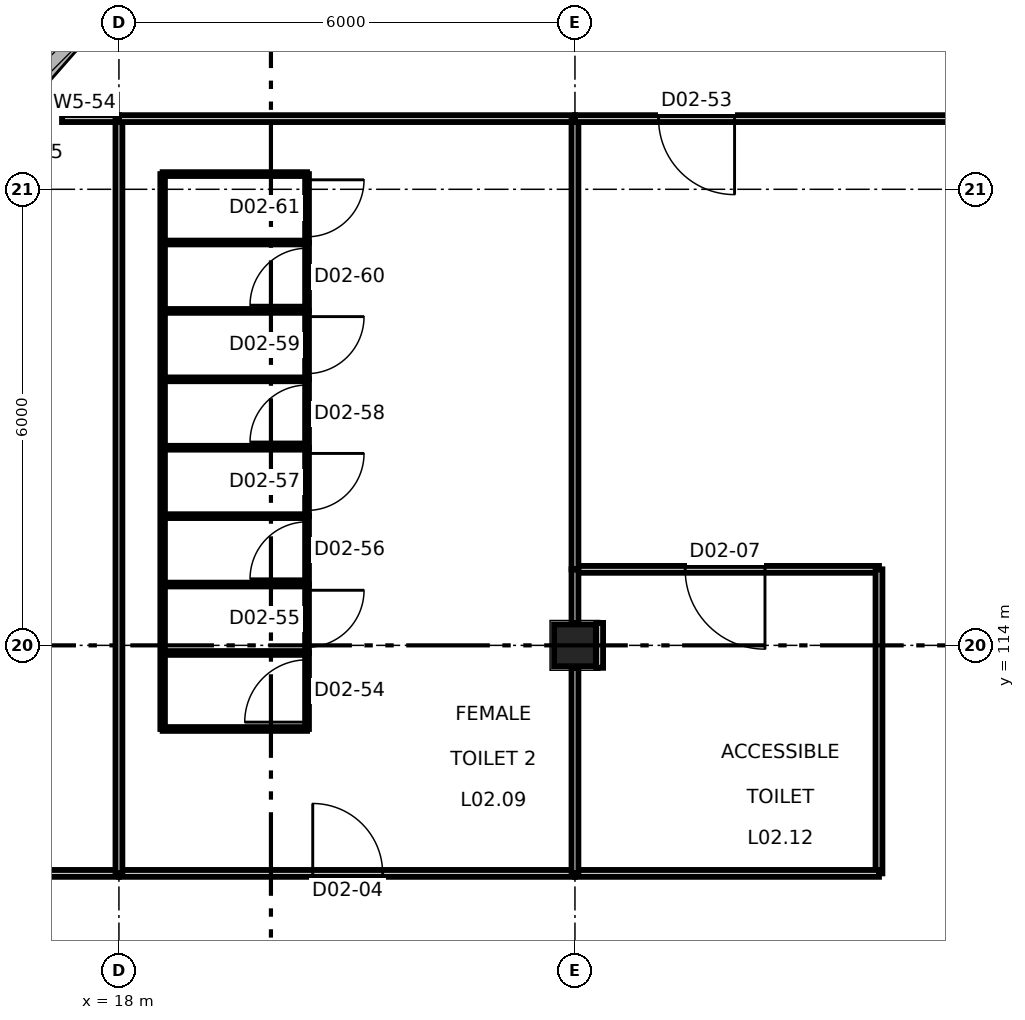
"""IFC4 building model, lengths in metres.
Left out: names, types, materials, properties, quantities, classifications, styles, units other than length and angle.
Written with IfcOpenShell. Run it as: python <this file> out.ifc"""

import sys

from ifc_helpers import new_model, si_unit, direction, frame, frame_2d, origin, origin_2d, place, context, subcontext, project, spatial, polyline, rectangle, outline, extrude, element, fill, save


model = new_model("IFC4")
c1 = context("Model", 3, precision=1e-05, world=origin(), true_north=direction((0.0, 1.0)))
c2 = subcontext(c1, "Body", "Model", "MODEL_VIEW")
j1 = project(units=[si_unit("LENGTHUNIT", "METRE"), si_unit("PLANEANGLEUNIT", "RADIAN")], contexts=[c1])
p1 = place(None, origin())
s1 = spatial("IfcSite", under=j1, at=p1, CompositionType="ELEMENT")
p2 = place(p1, origin())
s2 = spatial("IfcBuilding", under=s1, at=p2, CompositionType="ELEMENT")
p3 = place(p2, frame((0.0, 0.0, 12.0)))
s3 = spatial("IfcBuildingStorey", under=s2, at=p3, CompositionType="ELEMENT", Elevation=12.0)
p4 = place(p3, frame((24.0, 114.0, 0.0), z_axis=(0.0, 0.0, 1.0), x_axis=(1.0, 0.0, 0.0)))
e1 = element("IfcColumn", 1, at=p4, inside=s3, PredefinedType="COLUMN", context=c2, shape_type="SweptSolid", body=[
    extrude(rectangle(XDim=0.55, YDim=0.55, at=origin_2d()), origin(), (0.0, 0.0, 1.0), 4.5),
])
p5 = place(p3, frame((17.938, 122.571, 0.0), z_axis=(0.74138193161, -0.495258620594, 0.452848462745), x_axis=(-0.555487117891, -0.831525141854, 1.792587e-05)))
e2 = element("IfcWall", 2, at=p5, inside=s3, PredefinedType="SOLIDWALL", context=c2, shape_type="SweptSolid", body=[
    extrude(outline(polyline([(0.0, 0.0), (0.897, -2.776e-17), (0.759, -4.654), (0.138, -4.655), (0.0, 0.0)])), origin(), (9.955e-05, 0.453, 0.892), 0.449),
])
p6 = place(p3, frame((17.44, 121.825, 0.0), z_axis=(0.67027340996, -0.587941516676, 0.452833665786), x_axis=(-0.659435029258, -0.751761559077, 2.1938488e-05)))
e3 = element("IfcWall", 3, at=p6, inside=s3, PredefinedType="SOLIDWALL", context=c2, shape_type="SweptSolid", body=[
    extrude(outline(polyline([(0.0, 0.0), (0.897, -2.776e-17), (0.759, -4.654), (0.138, -4.654), (0.0, 0.0)])), origin(), (-0.0, 0.453, 0.892), 0.449),
])
p7 = place(p3, frame((16.848, 121.151, 0.0), z_axis=(0.58793091204, -0.670281410701, 0.452835591728), x_axis=(-0.75177274522, -0.659422276866, -1.779507e-05)))
e4 = element("IfcWall", 4, at=p7, inside=s3, PredefinedType="SOLIDWALL", context=c2, shape_type="SweptSolid", body=[
    extrude(outline(polyline([(0.0, 0.0), (0.897, 5.551e-17), (0.758, -4.654), (0.138, -4.654), (0.0, 0.0)])), origin(), (0.0, 0.453, 0.892), 0.449),
])
p8 = place(p3, frame((12.0, 111.0, 0.0), z_axis=(0.0, 0.0, 1.0), x_axis=(1.0, 0.0, 0.0)))
e5 = element("IfcWall", 5, at=p8, inside=s3, PredefinedType="PARTITIONING", context=c2, shape_type="SweptSolid", body=[
    extrude(rectangle(XDim=6.0, YDim=0.09, at=frame_2d((3.0, 0.0))), origin(), (0.0, 0.0, 1.0), 4.25),
])
p9 = place(p3, frame((17.251, 120.93, 0.0), z_axis=(0.0, 0.0, 1.0), x_axis=(1.0, 0.0, 0.0)))
e6 = element("IfcWall", 6, at=p9, inside=s3, PredefinedType="PARTITIONING", context=c2, shape_type="SweptSolid", body=[
    extrude(rectangle(XDim=0.749, YDim=0.09, at=frame_2d((0.374, 0.0))), origin(), (0.0, 0.0, 1.0), 4.25),
])
p10 = place(p3, frame((18.0, 111.0, 0.0), z_axis=(0.0, 0.0, 1.0), x_axis=(1.0, 0.0, 0.0)))
e7 = element("IfcWall", 7, at=p10, inside=s3, PredefinedType="PARTITIONING", context=c2, shape_type="SweptSolid", body=[
    extrude(rectangle(XDim=6.0, YDim=0.09, at=frame_2d((3.0, 0.0))), origin(), (0.0, 0.0, 1.0), 4.25),
])
p11 = place(p10, frame((2.55, 0.0, 0.0)))
e8 = element("IfcOpeningElement", 8, at=p11, cuts=e7, PredefinedType="OPENING", context=c2, shape_type="SweptSolid", body=[
    extrude(rectangle(XDim=0.92, YDim=2.04, at=frame_2d((0.46, 1.02))), frame((0.0, 0.055, 0.0), z_axis=(0.0, -1.0, 0.0), x_axis=(1.0, 0.0, 0.0)), (0.0, 0.0, 1.0), 0.11),
])
p12 = place(p3, frame((18.0, 111.0, 0.0), z_axis=(0.0, 0.0, 1.0), x_axis=(0.0, 1.0, 0.0)))
e9 = element("IfcWall", 9, at=p12, inside=s3, PredefinedType="PARTITIONING", context=c2, shape_type="SweptSolid", body=[
    extrude(rectangle(XDim=9.93, YDim=0.09, at=frame_2d((4.965, 0.0))), origin(), (0.0, 0.0, 1.0), 4.25),
])
p13 = place(p3, frame((18.0, 120.93, 0.0), z_axis=(0.0, 0.0, 1.0), x_axis=(1.0, 0.0, 0.0)))
e10 = element("IfcWall", 10, at=p13, inside=s3, PredefinedType="PARTITIONING", context=c2, shape_type="SweptSolid", body=[
    extrude(rectangle(XDim=6.0, YDim=0.09, at=frame_2d((3.0, 0.0))), origin(), (0.0, 0.0, 1.0), 4.25),
])
p14 = place(p3, frame((24.0, 115.0, 0.0), z_axis=(0.0, 0.0, 1.0), x_axis=(1.0, 0.0, 0.0)))
e11 = element("IfcWall", 11, at=p14, inside=s3, PredefinedType="PARTITIONING", context=c2, shape_type="SweptSolid", body=[
    extrude(rectangle(XDim=4.0, YDim=0.09, at=frame_2d((2.0, 0.0))), origin(), (0.0, 0.0, 1.0), 4.25),
])
p15 = place(p14, frame((1.45, 0.0, 0.0)))
e12 = element("IfcOpeningElement", 12, at=p15, cuts=e11, PredefinedType="OPENING", context=c2, shape_type="SweptSolid", body=[
    extrude(rectangle(XDim=1.05, YDim=2.1, at=frame_2d((0.525, 1.05))), frame((0.0, 0.055, 0.0), z_axis=(0.0, -1.0, 0.0), x_axis=(1.0, 0.0, 0.0)), (0.0, 0.0, 1.0), 0.11),
])
for number, where, z_axis, x_axis in (
    (13, (28.0, 111.0, 0.0), (0.0, 0.0, 1.0), (0.0, 1.0, 0.0)),
    (14, (24.0, 111.0, 0.0), (0.0, 0.0, 1.0), (1.0, 0.0, 0.0)),
):
    element("IfcWall", number, at=place(p3, frame(where, z_axis=z_axis, x_axis=x_axis)), inside=s3, PredefinedType="PARTITIONING", context=c2, shape_type="SweptSolid", body=[
        extrude(rectangle(XDim=4.0, YDim=0.09, at=frame_2d((2.0, 0.0))), origin(), (0.0, 0.0, 1.0), 4.25),
    ])
p16 = place(p3, frame((24.0, 114.295, 0.0), z_axis=(0.0, 0.0, 1.0), x_axis=(0.0, 1.0, 0.0)))
e15 = element("IfcWall", 15, at=p16, inside=s3, PredefinedType="PARTITIONING", context=c2, shape_type="SweptSolid", body=[
    extrude(rectangle(XDim=0.705, YDim=0.09, at=frame_2d((0.353, 0.0))), origin(), (0.0, 0.0, 1.0), 4.25),
])
p17 = place(p3, frame((24.0, 111.0, 0.0), z_axis=(0.0, 0.0, 1.0), x_axis=(0.0, 1.0, 0.0)))
e16 = element("IfcWall", 16, at=p17, inside=s3, PredefinedType="PARTITIONING", context=c2, shape_type="SweptSolid", body=[
    extrude(rectangle(XDim=2.705, YDim=0.09, at=frame_2d((1.353, 0.0))), origin(), (0.0, 0.0, 1.0), 4.25),
])
p18 = place(p3, frame((24.325, 113.705, 0.0), z_axis=(0.0, 0.0, 1.0), x_axis=(0.0, 1.0, 0.0)))
e17 = element("IfcWall", 17, at=p18, inside=s3, PredefinedType="PARTITIONING", context=c2, shape_type="SweptSolid", body=[
    extrude(rectangle(XDim=0.59, YDim=0.09, at=frame_2d((0.295, 0.0))), origin(), (0.0, 0.0, 1.0), 4.25),
])
p19 = place(p3, frame((24.0, 115.0, 0.0), z_axis=(0.0, 0.0, 1.0), x_axis=(0.0, 1.0, 0.0)))
e18 = element("IfcWall", 18, at=p19, inside=s3, PredefinedType="PARTITIONING", context=c2, shape_type="SweptSolid", body=[
    extrude(rectangle(XDim=5.93, YDim=0.09, at=frame_2d((2.965, 0.0))), origin(), (0.0, 0.0, 1.0), 4.25),
])
p20 = place(p3, frame((24.0, 120.93, 0.0), z_axis=(0.0, 0.0, 1.0), x_axis=(1.0, 0.0, 0.0)))
e19 = element("IfcWall", 19, at=p20, inside=s3, PredefinedType="PARTITIONING", context=c2, shape_type="SweptSolid", body=[
    extrude(rectangle(XDim=18.0, YDim=0.09, at=frame_2d((9.0, 0.0))), origin(), (0.0, 0.0, 1.0), 3.55),
])
p21 = place(p20, frame((9.85, 0.0, 0.0)))
e20 = element("IfcOpeningElement", 20, at=p21, cuts=e19, PredefinedType="OPENING", context=c2, shape_type="SweptSolid", body=[
    extrude(rectangle(XDim=1.8, YDim=2.1, at=frame_2d((0.9, 1.05))), frame((0.0, 0.055, 0.0), z_axis=(0.0, -1.0, 0.0), x_axis=(1.0, 0.0, 0.0)), (0.0, 0.0, 1.0), 0.11),
])
p22 = place(p20, frame((1.1, 0.0, 0.0)))
e21 = element("IfcOpeningElement", 21, at=p22, cuts=e19, PredefinedType="OPENING", context=c2, shape_type="SweptSolid", body=[
    extrude(rectangle(XDim=1.0, YDim=2.1, at=frame_2d((0.5, 1.05))), frame((0.0, 0.055, 0.0), z_axis=(0.0, -1.0, 0.0), x_axis=(1.0, 0.0, 0.0)), (0.0, 0.0, 1.0), 0.11),
])
p23 = place(p3, frame((18.575, 112.9, 0.0), z_axis=(0.0, 0.0, 1.0), x_axis=(0.0, 1.0, 0.0)))
e22 = element("IfcWall", 22, at=p23, inside=s3, PredefinedType="PARTITIONING", context=c2, shape_type="SweptSolid", body=[
    extrude(rectangle(XDim=7.3, YDim=0.06, at=frame_2d((3.65, 0.0))), origin(), (0.0, 0.0, 1.0), 2.1),
])
for number, where, z_axis, x_axis in (
    (23, (18.575, 112.9, 0.0), (0.0, 0.0, 1.0), (1.0, 0.0, 0.0)),
    (24, (18.575, 113.9, 0.0), (0.0, 0.0, 1.0), (1.0, 0.0, 0.0)),
    (25, (18.575, 114.8, 0.0), (0.0, 0.0, 1.0), (1.0, 0.0, 0.0)),
    (26, (18.575, 115.7, 0.0), (0.0, 0.0, 1.0), (1.0, 0.0, 0.0)),
    (27, (18.575, 116.6, 0.0), (0.0, 0.0, 1.0), (1.0, 0.0, 0.0)),
    (28, (18.575, 117.5, 0.0), (0.0, 0.0, 1.0), (1.0, 0.0, 0.0)),
    (29, (18.575, 118.4, 0.0), (0.0, 0.0, 1.0), (1.0, 0.0, 0.0)),
    (30, (18.575, 119.3, 0.0), (0.0, 0.0, 1.0), (1.0, 0.0, 0.0)),
    (31, (18.575, 120.2, 0.0), (0.0, 0.0, 1.0), (1.0, 0.0, 0.0)),
):
    element("IfcWall", number, at=place(p3, frame(where, z_axis=z_axis, x_axis=x_axis)), inside=s3, PredefinedType="PARTITIONING", context=c2, shape_type="SweptSolid", body=[
        extrude(rectangle(XDim=1.9, YDim=0.05, at=frame_2d((0.95, 0.0))), origin(), (0.0, 0.0, 1.0), 2.1),
    ])
p24 = place(p3, frame((20.475, 112.9, 0.0), z_axis=(0.0, 0.0, 1.0), x_axis=(0.0, 1.0, 0.0)))
e32 = element("IfcWall", 32, at=p24, inside=s3, PredefinedType="PARTITIONING", context=c2, shape_type="SweptSolid", body=[
    extrude(rectangle(XDim=1.0, YDim=0.05, at=frame_2d((0.5, 0.0))), origin(), (0.0, 0.0, 1.0), 2.1),
])
p25 = place(p24, frame((0.09, 0.0, 0.0)))
e33 = element("IfcOpeningElement", 33, at=p25, cuts=e32, PredefinedType="OPENING", context=c2, shape_type="SweptSolid", body=[
    extrude(rectangle(XDim=0.82, YDim=2.0, at=frame_2d((0.41, 1.0))), frame((0.0, 0.035, 0.0), z_axis=(0.0, -1.0, 0.0), x_axis=(1.0, 0.0, 0.0)), (0.0, 0.0, 1.0), 0.07),
])
p26 = place(p3, frame((20.475, 113.9, 0.0), z_axis=(0.0, 0.0, 1.0), x_axis=(0.0, 1.0, 0.0)))
e34 = element("IfcWall", 34, at=p26, inside=s3, PredefinedType="PARTITIONING", context=c2, shape_type="SweptSolid", body=[
    extrude(rectangle(XDim=0.9, YDim=0.05, at=frame_2d((0.45, 0.0))), origin(), (0.0, 0.0, 1.0), 2.1),
])
p27 = place(p26, frame((0.075, 0.0, 0.0)))
e35 = element("IfcOpeningElement", 35, at=p27, cuts=e34, PredefinedType="OPENING", context=c2, shape_type="SweptSolid", body=[
    extrude(rectangle(XDim=0.75, YDim=2.0, at=frame_2d((0.375, 1.0))), frame((0.0, 0.035, 0.0), z_axis=(0.0, -1.0, 0.0), x_axis=(1.0, 0.0, 0.0)), (0.0, 0.0, 1.0), 0.07),
])
p28 = place(p3, frame((20.475, 114.8, 0.0), z_axis=(0.0, 0.0, 1.0), x_axis=(0.0, 1.0, 0.0)))
e36 = element("IfcWall", 36, at=p28, inside=s3, PredefinedType="PARTITIONING", context=c2, shape_type="SweptSolid", body=[
    extrude(rectangle(XDim=0.9, YDim=0.05, at=frame_2d((0.45, 0.0))), origin(), (0.0, 0.0, 1.0), 2.1),
])
p29 = place(p28, frame((0.075, 0.0, 0.0)))
e37 = element("IfcOpeningElement", 37, at=p29, cuts=e36, PredefinedType="OPENING", context=c2, shape_type="SweptSolid", body=[
    extrude(rectangle(XDim=0.75, YDim=2.0, at=frame_2d((0.375, 1.0))), frame((0.0, 0.035, 0.0), z_axis=(0.0, -1.0, 0.0), x_axis=(1.0, 0.0, 0.0)), (0.0, 0.0, 1.0), 0.07),
])
p30 = place(p3, frame((20.475, 115.7, 0.0), z_axis=(0.0, 0.0, 1.0), x_axis=(0.0, 1.0, 0.0)))
e38 = element("IfcWall", 38, at=p30, inside=s3, PredefinedType="PARTITIONING", context=c2, shape_type="SweptSolid", body=[
    extrude(rectangle(XDim=0.9, YDim=0.05, at=frame_2d((0.45, 0.0))), origin(), (0.0, 0.0, 1.0), 2.1),
])
p31 = place(p30, frame((0.075, 0.0, 0.0)))
e39 = element("IfcOpeningElement", 39, at=p31, cuts=e38, PredefinedType="OPENING", context=c2, shape_type="SweptSolid", body=[
    extrude(rectangle(XDim=0.75, YDim=2.0, at=frame_2d((0.375, 1.0))), frame((0.0, 0.035, 0.0), z_axis=(0.0, -1.0, 0.0), x_axis=(1.0, 0.0, 0.0)), (0.0, 0.0, 1.0), 0.07),
])
p32 = place(p3, frame((20.475, 116.6, 0.0), z_axis=(0.0, 0.0, 1.0), x_axis=(0.0, 1.0, 0.0)))
e40 = element("IfcWall", 40, at=p32, inside=s3, PredefinedType="PARTITIONING", context=c2, shape_type="SweptSolid", body=[
    extrude(rectangle(XDim=0.9, YDim=0.05, at=frame_2d((0.45, 0.0))), origin(), (0.0, 0.0, 1.0), 2.1),
])
p33 = place(p32, frame((0.075, 0.0, 0.0)))
e41 = element("IfcOpeningElement", 41, at=p33, cuts=e40, PredefinedType="OPENING", context=c2, shape_type="SweptSolid", body=[
    extrude(rectangle(XDim=0.75, YDim=2.0, at=frame_2d((0.375, 1.0))), frame((0.0, 0.035, 0.0), z_axis=(0.0, -1.0, 0.0), x_axis=(1.0, 0.0, 0.0)), (0.0, 0.0, 1.0), 0.07),
])
p34 = place(p3, frame((20.475, 117.5, 0.0), z_axis=(0.0, 0.0, 1.0), x_axis=(0.0, 1.0, 0.0)))
e42 = element("IfcWall", 42, at=p34, inside=s3, PredefinedType="PARTITIONING", context=c2, shape_type="SweptSolid", body=[
    extrude(rectangle(XDim=0.9, YDim=0.05, at=frame_2d((0.45, 0.0))), origin(), (0.0, 0.0, 1.0), 2.1),
])
p35 = place(p34, frame((0.075, 0.0, 0.0)))
e43 = element("IfcOpeningElement", 43, at=p35, cuts=e42, PredefinedType="OPENING", context=c2, shape_type="SweptSolid", body=[
    extrude(rectangle(XDim=0.75, YDim=2.0, at=frame_2d((0.375, 1.0))), frame((0.0, 0.035, 0.0), z_axis=(0.0, -1.0, 0.0), x_axis=(1.0, 0.0, 0.0)), (0.0, 0.0, 1.0), 0.07),
])
p36 = place(p3, frame((20.475, 118.4, 0.0), z_axis=(0.0, 0.0, 1.0), x_axis=(0.0, 1.0, 0.0)))
e44 = element("IfcWall", 44, at=p36, inside=s3, PredefinedType="PARTITIONING", context=c2, shape_type="SweptSolid", body=[
    extrude(rectangle(XDim=0.9, YDim=0.05, at=frame_2d((0.45, 0.0))), origin(), (0.0, 0.0, 1.0), 2.1),
])
p37 = place(p36, frame((0.075, 0.0, 0.0)))
e45 = element("IfcOpeningElement", 45, at=p37, cuts=e44, PredefinedType="OPENING", context=c2, shape_type="SweptSolid", body=[
    extrude(rectangle(XDim=0.75, YDim=2.0, at=frame_2d((0.375, 1.0))), frame((0.0, 0.035, 0.0), z_axis=(0.0, -1.0, 0.0), x_axis=(1.0, 0.0, 0.0)), (0.0, 0.0, 1.0), 0.07),
])
p38 = place(p3, frame((20.475, 119.3, 0.0), z_axis=(0.0, 0.0, 1.0), x_axis=(0.0, 1.0, 0.0)))
e46 = element("IfcWall", 46, at=p38, inside=s3, PredefinedType="PARTITIONING", context=c2, shape_type="SweptSolid", body=[
    extrude(rectangle(XDim=0.9, YDim=0.05, at=frame_2d((0.45, 0.0))), origin(), (0.0, 0.0, 1.0), 2.1),
])
p39 = place(p38, frame((0.075, 0.0, 0.0)))
e47 = element("IfcOpeningElement", 47, at=p39, cuts=e46, PredefinedType="OPENING", context=c2, shape_type="SweptSolid", body=[
    extrude(rectangle(XDim=0.75, YDim=2.0, at=frame_2d((0.375, 1.0))), frame((0.0, 0.035, 0.0), z_axis=(0.0, -1.0, 0.0), x_axis=(1.0, 0.0, 0.0)), (0.0, 0.0, 1.0), 0.07),
])
p40 = place(p11, origin())
e48 = element("IfcDoor", 48, at=p40, inside=s3, OperationType="SINGLE_SWING_LEFT", PredefinedType="DOOR", context=c2, shape_type="SweptSolid", body=[
    extrude(rectangle(XDim=0.92, YDim=2.04, at=frame_2d((0.46, 1.02))), frame((0.0, 0.025, 0.0), z_axis=(0.0, -1.0, 0.0), x_axis=(1.0, 0.0, 0.0)), (0.0, 0.0, 1.0), 0.05),
])
fill(e8, e48)
p41 = place(p15, frame((1.05, 0.0, 0.0), z_axis=(0.0, 0.0, 1.0), x_axis=(-1.0, 0.0, 0.0)))
e49 = element("IfcDoor", 49, at=p41, inside=s3, OperationType="SINGLE_SWING_RIGHT", PredefinedType="DOOR", context=c2, shape_type="SweptSolid", body=[
    extrude(rectangle(XDim=1.05, YDim=2.1, at=frame_2d((0.525, 1.05))), frame((0.0, 0.025, 0.0), z_axis=(0.0, -1.0, 0.0), x_axis=(1.0, 0.0, 0.0)), (0.0, 0.0, 1.0), 0.05),
])
fill(e12, e49)
p42 = place(p22, frame((1.0, 0.0, 0.0), z_axis=(0.0, 0.0, 1.0), x_axis=(-1.0, 0.0, 0.0)))
e50 = element("IfcDoor", 50, at=p42, inside=s3, OperationType="SINGLE_SWING_RIGHT", PredefinedType="DOOR", context=c2, shape_type="SweptSolid", body=[
    extrude(rectangle(XDim=1.0, YDim=2.1, at=frame_2d((0.5, 1.05))), frame((0.0, 0.025, 0.0), z_axis=(0.0, -1.0, 0.0), x_axis=(1.0, 0.0, 0.0)), (0.0, 0.0, 1.0), 0.05),
])
fill(e21, e50)
p43 = place(p25, origin())
e51 = element("IfcDoor", 51, at=p43, inside=s3, OperationType="SINGLE_SWING_LEFT", PredefinedType="DOOR", context=c2, shape_type="SweptSolid", body=[
    extrude(rectangle(XDim=0.82, YDim=2.0, at=frame_2d((0.41, 1.0))), frame((0.0, 0.025, 0.0), z_axis=(0.0, -1.0, 0.0), x_axis=(1.0, 0.0, 0.0)), (0.0, 0.0, 1.0), 0.05),
])
fill(e33, e51)
p44 = place(p27, origin())
e52 = element("IfcDoor", 52, at=p44, inside=s3, OperationType="SINGLE_SWING_RIGHT", PredefinedType="DOOR", context=c2, shape_type="SweptSolid", body=[
    extrude(rectangle(XDim=0.75, YDim=2.0, at=frame_2d((0.375, 1.0))), frame((0.0, 0.025, 0.0), z_axis=(0.0, -1.0, 0.0), x_axis=(1.0, 0.0, 0.0)), (0.0, 0.0, 1.0), 0.05),
])
fill(e35, e52)
p45 = place(p29, origin())
e53 = element("IfcDoor", 53, at=p45, inside=s3, OperationType="SINGLE_SWING_LEFT", PredefinedType="DOOR", context=c2, shape_type="SweptSolid", body=[
    extrude(rectangle(XDim=0.75, YDim=2.0, at=frame_2d((0.375, 1.0))), frame((0.0, 0.025, 0.0), z_axis=(0.0, -1.0, 0.0), x_axis=(1.0, 0.0, 0.0)), (0.0, 0.0, 1.0), 0.05),
])
fill(e37, e53)
p46 = place(p31, origin())
e54 = element("IfcDoor", 54, at=p46, inside=s3, OperationType="SINGLE_SWING_RIGHT", PredefinedType="DOOR", context=c2, shape_type="SweptSolid", body=[
    extrude(rectangle(XDim=0.75, YDim=2.0, at=frame_2d((0.375, 1.0))), frame((0.0, 0.025, 0.0), z_axis=(0.0, -1.0, 0.0), x_axis=(1.0, 0.0, 0.0)), (0.0, 0.0, 1.0), 0.05),
])
fill(e39, e54)
p47 = place(p33, origin())
e55 = element("IfcDoor", 55, at=p47, inside=s3, OperationType="SINGLE_SWING_LEFT", PredefinedType="DOOR", context=c2, shape_type="SweptSolid", body=[
    extrude(rectangle(XDim=0.75, YDim=2.0, at=frame_2d((0.375, 1.0))), frame((0.0, 0.025, 0.0), z_axis=(0.0, -1.0, 0.0), x_axis=(1.0, 0.0, 0.0)), (0.0, 0.0, 1.0), 0.05),
])
fill(e41, e55)
p48 = place(p35, origin())
e56 = element("IfcDoor", 56, at=p48, inside=s3, OperationType="SINGLE_SWING_RIGHT", PredefinedType="DOOR", context=c2, shape_type="SweptSolid", body=[
    extrude(rectangle(XDim=0.75, YDim=2.0, at=frame_2d((0.375, 1.0))), frame((0.0, 0.025, 0.0), z_axis=(0.0, -1.0, 0.0), x_axis=(1.0, 0.0, 0.0)), (0.0, 0.0, 1.0), 0.05),
])
fill(e43, e56)
p49 = place(p37, origin())
e57 = element("IfcDoor", 57, at=p49, inside=s3, OperationType="SINGLE_SWING_LEFT", PredefinedType="DOOR", context=c2, shape_type="SweptSolid", body=[
    extrude(rectangle(XDim=0.75, YDim=2.0, at=frame_2d((0.375, 1.0))), frame((0.0, 0.025, 0.0), z_axis=(0.0, -1.0, 0.0), x_axis=(1.0, 0.0, 0.0)), (0.0, 0.0, 1.0), 0.05),
])
fill(e45, e57)
p50 = place(p39, origin())
e58 = element("IfcDoor", 58, at=p50, inside=s3, OperationType="SINGLE_SWING_RIGHT", PredefinedType="DOOR", context=c2, shape_type="SweptSolid", body=[
    extrude(rectangle(XDim=0.75, YDim=2.0, at=frame_2d((0.375, 1.0))), frame((0.0, 0.025, 0.0), z_axis=(0.0, -1.0, 0.0), x_axis=(1.0, 0.0, 0.0)), (0.0, 0.0, 1.0), 0.05),
])
fill(e47, e58)
save(model, sys.argv[1])
